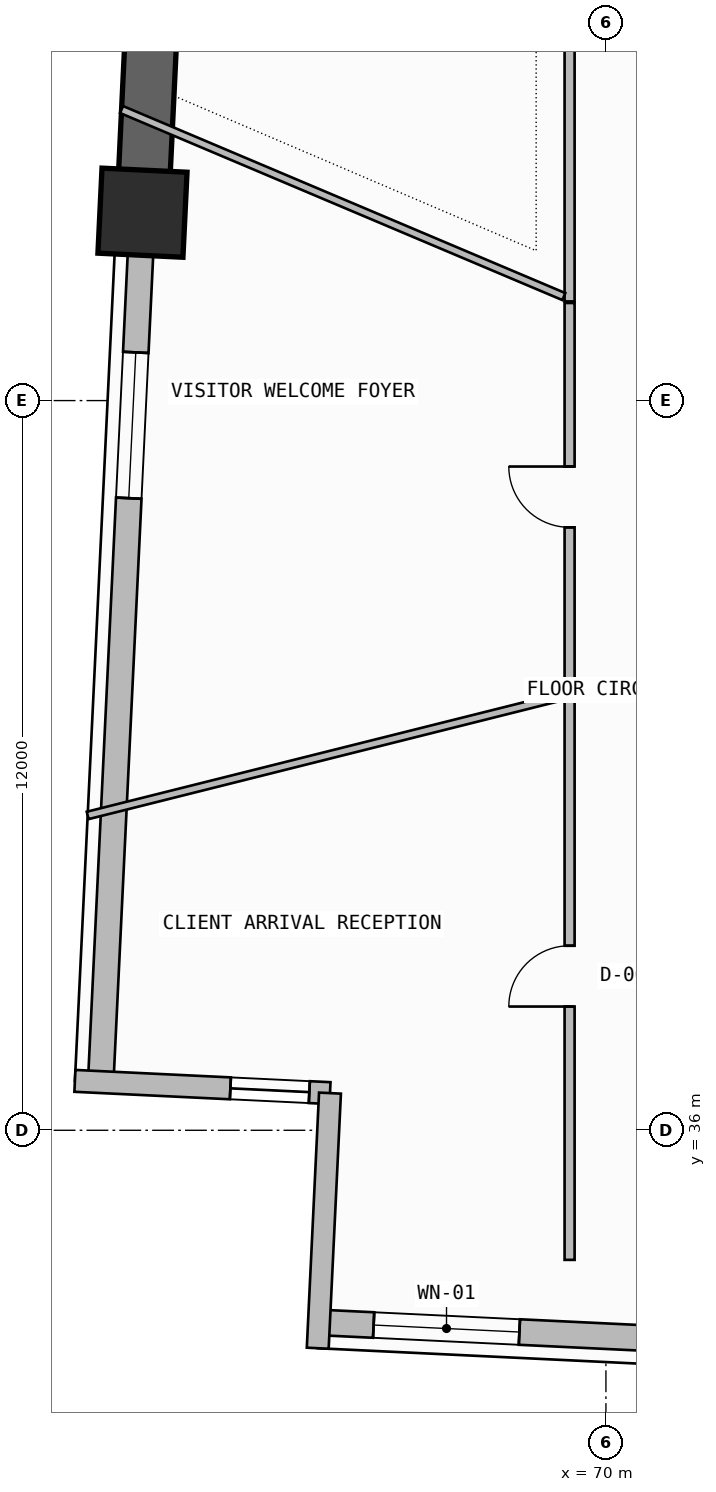
"""IFC4 building model, lengths in metres.
Left out: names, types, materials, properties, quantities, classifications, styles, units other than length and angle.
Written with IfcOpenShell. Run it as: python <this file> out.ifc"""

import sys

from ifc_helpers import new_model, si_unit, direction, frame, frame_2d, origin, origin_2d, place, context, subcontext, project, spatial, rectangle, extrude, element, fill, save


model = new_model("IFC4")
c1 = context("Model", 3, precision=1e-05, world=origin(), true_north=direction((0.0, 1.0)))
c2 = subcontext(c1, "Body", "Model", "MODEL_VIEW")
j1 = project(units=[si_unit("LENGTHUNIT", "METRE"), si_unit("PLANEANGLEUNIT", "RADIAN")], contexts=[c1])
p1 = place(None, origin())
s1 = spatial("IfcSite", under=j1, at=p1, CompositionType="ELEMENT")
p2 = place(p1, origin())
s2 = spatial("IfcBuilding", under=s1, at=p2, CompositionType="ELEMENT")
p3 = place(p2, frame((0.0, 0.0, 30.3)))
s3 = spatial("IfcBuildingStorey", under=s2, at=p3, CompositionType="ELEMENT", Elevation=30.3)
p4 = place(p3, frame((62.378, 51.09, 0.0), z_axis=(0.0, 0.0, 1.0), x_axis=(0.047978128521, 0.998848386485, 0.0)))
e1 = element("IfcColumn", 1, at=p4, inside=s3, PredefinedType="COLUMN", context=c2, shape_type="SweptSolid", body=[
    extrude(rectangle(XDim=1.4, YDim=1.4, at=origin_2d()), origin(), (0.0, 0.0, 1.0), 3.6),
])
p5 = place(p3, frame((65.281, 32.841, 0.0), z_axis=(0.0, 0.0, 1.0), x_axis=(0.998848298084, -0.047979968897, 0.0)))
e2 = element("IfcWall", 2, at=p5, inside=s3, PredefinedType="SOLIDWALL", context=c2, shape_type="SweptSolid", body=[
    extrude(rectangle(XDim=17.952, YDim=0.42, at=frame_2d((8.976, 0.0))), origin(), (0.0, 0.0, 1.0), 2.385),
])
p6 = place(p5, frame((0.9, 0.0, 1.2)))
e3 = element("IfcOpeningElement", 3, at=p6, cuts=e2, PredefinedType="OPENING", context=c2, shape_type="SweptSolid", body=[
    extrude(rectangle(XDim=2.4, YDim=0.9, at=frame_2d((1.2, 0.45))), frame((0.0, 0.22, 0.0), z_axis=(0.0, -1.0, 0.0), x_axis=(1.0, 0.0, 0.0)), (0.0, 0.0, 1.0), 0.44),
])
p7 = place(p3, frame((63.428, 72.957, -0.2), z_axis=(0.0, 0.0, 1.0), x_axis=(-0.047976309476, -0.998848473858, 0.0)))
e4 = element("IfcWall", 4, at=p7, inside=s3, PredefinedType="SHEAR", context=c2, shape_type="SweptSolid", body=[
    extrude(rectangle(XDim=21.892, YDim=0.85, at=frame_2d((10.946, 0.0))), origin(), (0.0, 0.0, 1.0), 3.6),
])
p8 = place(p3, frame((62.378, 51.09, 0.0), z_axis=(0.0, 0.0, 1.0), x_axis=(-0.047978424452, -0.99884837227, 0.0)))
e5 = element("IfcWall", 5, at=p8, inside=s3, PredefinedType="SOLIDWALL", context=c2, shape_type="SweptSolid", body=[
    extrude(rectangle(XDim=14.314, YDim=0.42, at=frame_2d((7.157, 0.0))), origin(), (0.0, 0.0, 1.0), 2.385),
])
p9 = place(p8, frame((2.3, 0.0, 1.2)))
e6 = element("IfcOpeningElement", 6, at=p9, cuts=e5, PredefinedType="OPENING", context=c2, shape_type="SweptSolid", body=[
    extrude(rectangle(XDim=2.4, YDim=0.9, at=frame_2d((1.2, 0.45))), frame((0.0, 0.22, 0.0), z_axis=(0.0, -1.0, 0.0), x_axis=(1.0, 0.0, 0.0)), (0.0, 0.0, 1.0), 0.44),
])
p10 = place(p3, frame((61.267, 36.812, 0.0), z_axis=(0.0, 0.0, 1.0), x_axis=(0.998849519138, -0.047954542207, 0.0)))
e7 = element("IfcWall", 7, at=p10, inside=s3, PredefinedType="SOLIDWALL", context=c2, shape_type="SweptSolid", body=[
    extrude(rectangle(XDim=4.2, YDim=0.36, at=frame_2d((2.1, 0.0))), origin(), (0.0, 0.0, 1.0), 3.4),
])
p11 = place(p10, frame((2.56, 0.0, 0.45)))
e8 = element("IfcOpeningElement", 8, at=p11, cuts=e7, PredefinedType="OPENING", context=c2, shape_type="SweptSolid", body=[
    extrude(rectangle(XDim=1.3, YDim=2.4, at=frame_2d((0.65, 1.2))), frame((0.0, 0.19, 0.0), z_axis=(0.0, -1.0, 0.0), x_axis=(1.0, 0.0, 0.0)), (0.0, 0.0, 1.0), 0.38),
])
p12 = place(p3, frame((65.462, 36.611, 0.0), z_axis=(0.0, 0.0, 1.0), x_axis=(-0.048015322758, -0.998846599224, 0.0)))
e9 = element("IfcWall", 9, at=p12, inside=s3, PredefinedType="SOLIDWALL", context=c2, shape_type="SweptSolid", body=[
    extrude(rectangle(XDim=4.2, YDim=0.36, at=frame_2d((2.1, 0.0))), origin(), (0.0, 0.0, 1.0), 3.4),
])
p13 = place(p3, frame((69.403, 43.201, 0.0), z_axis=(0.0, 0.0, 1.0), x_axis=(0.0, -1.0, 0.0)))
e10 = element("IfcWall", 10, at=p13, inside=s3, PredefinedType="PARTITIONING", context=c2, shape_type="SweptSolid", body=[
    extrude(rectangle(XDim=9.332, YDim=0.165, at=frame_2d((4.666, 0.0))), origin(), (0.0, 0.0, 1.0), 3.4),
])
p14 = place(p13, frame((4.166, 0.0, 0.0)))
e11 = element("IfcOpeningElement", 11, at=p14, cuts=e10, PredefinedType="OPENING", context=c2, shape_type="SweptSolid", body=[
    extrude(rectangle(XDim=1.0, YDim=2.2, at=frame_2d((0.5, 1.1))), frame((0.0, 0.093, 0.0), z_axis=(0.0, -1.0, 0.0), x_axis=(1.0, 0.0, 0.0)), (0.0, 0.0, 1.0), 0.185),
])
p15 = place(p3, frame((61.476, 41.177, 0.0), z_axis=(0.0, 0.0, 1.0), x_axis=(0.970005385026, 0.243083428106, 0.0)))
e12 = element("IfcWall", 12, at=p15, inside=s3, PredefinedType="PARTITIONING", context=c2, shape_type="SweptSolid", body=[
    extrude(rectangle(XDim=8.074, YDim=0.125, at=frame_2d((4.037, 0.0))), origin(), (0.0, 0.0, 1.0), 3.4),
])
p16 = place(p3, frame((69.403, 58.998, 0.0), z_axis=(0.0, 0.0, 1.0), x_axis=(0.0, -1.0, 0.0)))
e13 = element("IfcWall", 13, at=p16, inside=s3, PredefinedType="PARTITIONING", context=c2, shape_type="SweptSolid", body=[
    extrude(rectangle(XDim=9.366, YDim=0.165, at=frame_2d((4.683, 0.0))), origin(), (0.0, 0.0, 1.0), 2.785),
])
p17 = place(p16, frame((4.183, 0.0, 0.0)))
e14 = element("IfcOpeningElement", 14, at=p17, cuts=e13, PredefinedType="OPENING", context=c2, shape_type="SweptSolid", body=[
    extrude(rectangle(XDim=1.0, YDim=2.2, at=frame_2d((0.5, 1.1))), frame((0.0, 0.093, 0.0), z_axis=(0.0, -1.0, 0.0), x_axis=(1.0, 0.0, 0.0)), (0.0, 0.0, 1.0), 0.185),
])
p18 = place(p3, frame((69.308, 49.71, 0.0), z_axis=(0.0, 0.0, 1.0), x_axis=(-0.921029102653, 0.389493763834, 0.0)))
e15 = element("IfcWall", 15, at=p18, inside=s3, PredefinedType="PARTITIONING", context=c2, shape_type="SweptSolid", body=[
    extrude(rectangle(XDim=7.898, YDim=0.125, at=frame_2d((3.949, 0.0))), origin(), (0.0, 0.0, 1.0), 2.385),
])
p19 = place(p3, frame((69.403, 49.605, 0.0), z_axis=(0.0, 0.0, 1.0), x_axis=(0.0, -1.0, 0.0)))
e16 = element("IfcWall", 16, at=p19, inside=s3, PredefinedType="PARTITIONING", context=c2, shape_type="SweptSolid", body=[
    extrude(rectangle(XDim=6.379, YDim=0.165, at=frame_2d((3.19, 0.0))), origin(), (0.0, 0.0, 1.0), 3.4),
])
p20 = place(p19, frame((2.69, 0.0, 0.0)))
e17 = element("IfcOpeningElement", 17, at=p20, cuts=e16, PredefinedType="OPENING", context=c2, shape_type="SweptSolid", body=[
    extrude(rectangle(XDim=1.0, YDim=2.2, at=frame_2d((0.5, 1.1))), frame((0.0, 0.093, 0.0), z_axis=(0.0, -1.0, 0.0), x_axis=(1.0, 0.0, 0.0)), (0.0, 0.0, 1.0), 0.185),
])
p21 = place(p6, origin())
e18 = element("IfcWindow", 18, at=p21, inside=s3, PartitioningType="SINGLE_PANEL", PredefinedType="WINDOW", context=c2, shape_type="SweptSolid", body=[
    extrude(rectangle(XDim=2.4, YDim=0.9, at=frame_2d((1.2, 0.45))), frame((0.0, 0.03, 0.0), z_axis=(0.0, -1.0, 0.0), x_axis=(1.0, 0.0, 0.0)), (0.0, 0.0, 1.0), 0.06),
])
fill(e3, e18)
p22 = place(p9, origin())
e19 = element("IfcWindow", 19, at=p22, inside=s3, PartitioningType="SINGLE_PANEL", PredefinedType="WINDOW", context=c2, shape_type="SweptSolid", body=[
    extrude(rectangle(XDim=2.4, YDim=0.9, at=frame_2d((1.2, 0.45))), frame((0.0, 0.03, 0.0), z_axis=(0.0, -1.0, 0.0), x_axis=(1.0, 0.0, 0.0)), (0.0, 0.0, 1.0), 0.06),
])
fill(e6, e19)
p23 = place(p11, origin())
e20 = element("IfcWindow", 20, at=p23, inside=s3, PartitioningType="SINGLE_PANEL", PredefinedType="WINDOW", context=c2, shape_type="SweptSolid", body=[
    extrude(rectangle(XDim=1.3, YDim=2.4, at=frame_2d((0.65, 1.2))), frame((0.0, 0.03, 0.0), z_axis=(0.0, -1.0, 0.0), x_axis=(1.0, 0.0, 0.0)), (0.0, 0.0, 1.0), 0.06),
])
fill(e8, e20)
p24 = place(p14, frame((1.0, 0.0, 0.0), z_axis=(0.0, 0.0, 1.0), x_axis=(-1.0, 0.0, 0.0)))
e21 = element("IfcDoor", 21, at=p24, inside=s3, OperationType="SINGLE_SWING_LEFT", PredefinedType="DOOR", context=c2, shape_type="SweptSolid", body=[
    extrude(rectangle(XDim=1.0, YDim=2.2, at=frame_2d((0.5, 1.1))), frame((0.0, 0.025, 0.0), z_axis=(0.0, -1.0, 0.0), x_axis=(1.0, 0.0, 0.0)), (0.0, 0.0, 1.0), 0.05),
])
fill(e11, e21)
p25 = place(p20, frame((1.0, 0.0, 0.0), z_axis=(0.0, 0.0, 1.0), x_axis=(-1.0, 0.0, 0.0)))
e22 = element("IfcDoor", 22, at=p25, inside=s3, OperationType="SINGLE_SWING_RIGHT", PredefinedType="DOOR", context=c2, shape_type="SweptSolid", body=[
    extrude(rectangle(XDim=1.0, YDim=2.2, at=frame_2d((0.5, 1.1))), frame((0.0, 0.025, 0.0), z_axis=(0.0, -1.0, 0.0), x_axis=(1.0, 0.0, 0.0)), (0.0, 0.0, 1.0), 0.05),
])
fill(e17, e22)
save(model, sys.argv[1])
